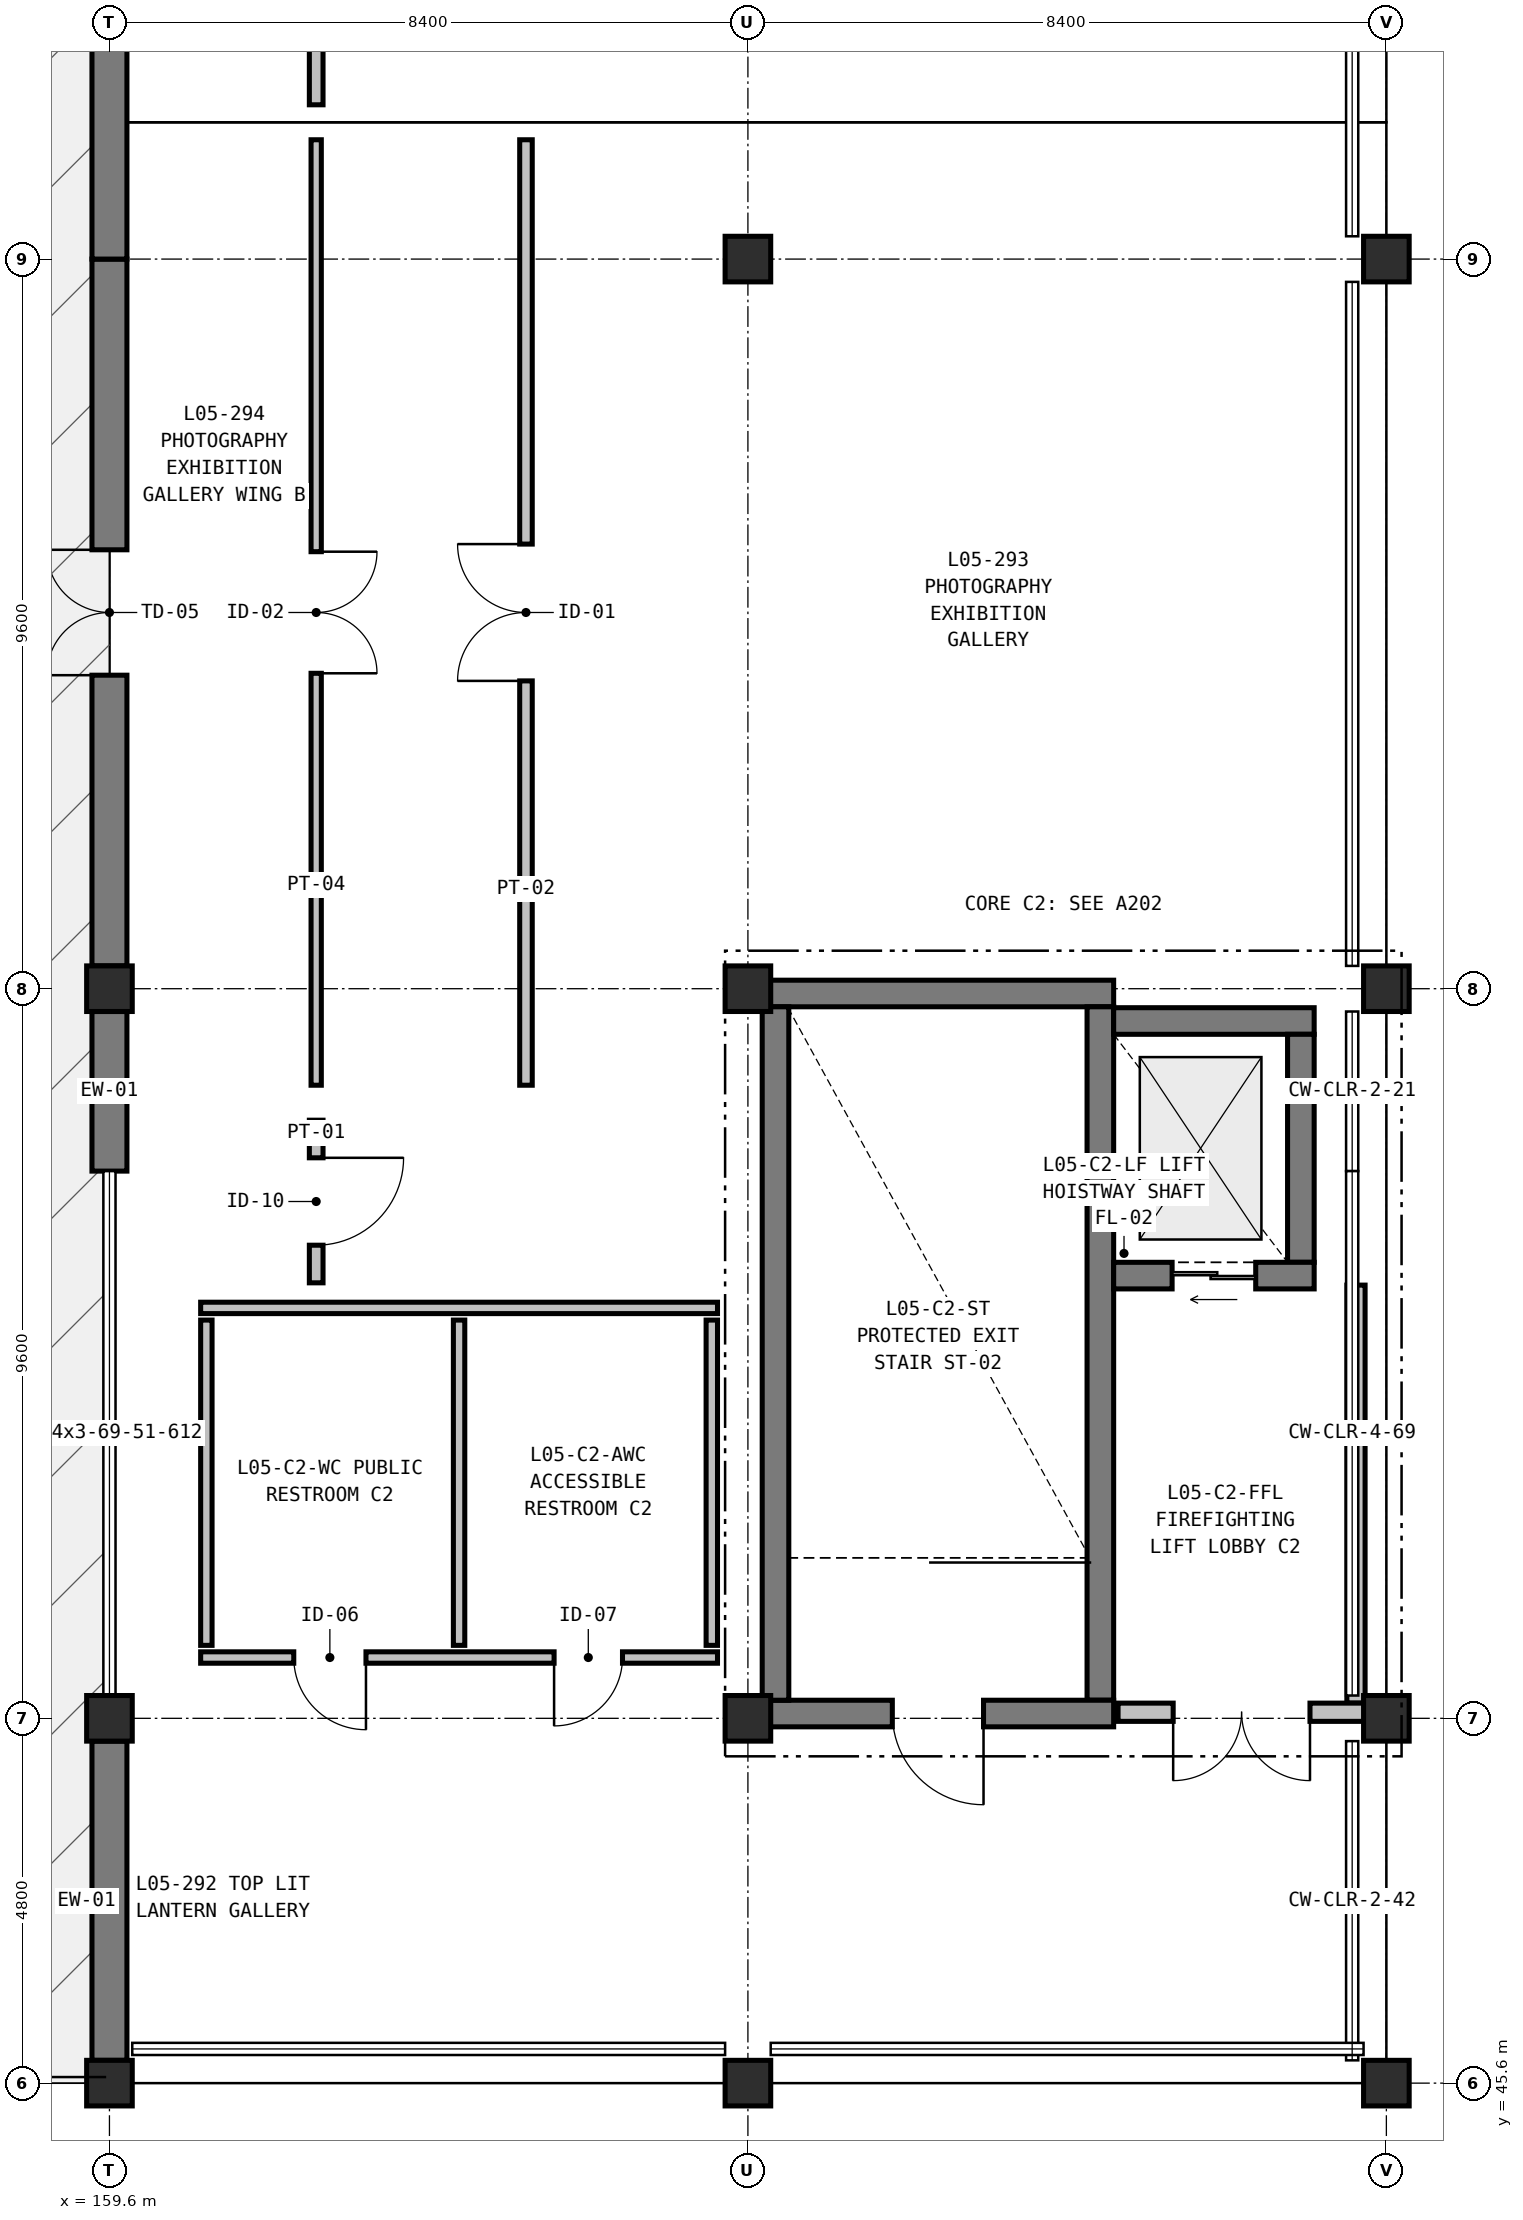
"""IFC4 building model, lengths in metres.
Left out: names, types, materials, properties, quantities, classifications, styles, units other than length and angle.
Written with IfcOpenShell. Run it as: python <this file> out.ifc"""

import sys

from ifc_helpers import new_model, si_unit, direction, frame, frame_2d, origin, origin_2d, place, context, subcontext, project, spatial, rectangle, extrude, element, fill, save


model = new_model("IFC4")
c1 = context("Model", 3, precision=1e-05, world=origin(), true_north=direction((0.0, 1.0)))
c2 = subcontext(c1, "Body", "Model", "MODEL_VIEW")
j1 = project(units=[si_unit("LENGTHUNIT", "METRE"), si_unit("PLANEANGLEUNIT", "RADIAN")], contexts=[c1])
p1 = place(None, origin())
s1 = spatial("IfcSite", under=j1, at=p1, CompositionType="ELEMENT")
p2 = place(p1, origin())
s2 = spatial("IfcBuilding", under=s1, at=p2, CompositionType="ELEMENT")
p3 = place(p2, frame((0.0, 0.0, 27.0)))
s3 = spatial("IfcBuildingStorey", under=s2, at=p3, CompositionType="ELEMENT", Elevation=27.0)
for number, where, z_axis, x_axis in (
    (1, (159.6, 45.6, 0.0), (0.0, 0.0, 1.0), (1.0, 0.0, 0.0)),
    (2, (159.6, 50.4, 0.0), (0.0, 0.0, 1.0), (1.0, 0.0, 0.0)),
    (3, (159.6, 60.0, 0.0), (0.0, 0.0, 1.0), (1.0, 0.0, 0.0)),
    (4, (168.0, 45.6, 0.0), (0.0, 0.0, 1.0), (1.0, 0.0, 0.0)),
    (5, (168.0, 50.4, 0.0), (0.0, 0.0, 1.0), (1.0, 0.0, 0.0)),
    (6, (168.0, 60.0, 0.0), (0.0, 0.0, 1.0), (1.0, 0.0, 0.0)),
    (7, (168.0, 69.6, 0.0), (0.0, 0.0, 1.0), (1.0, 0.0, 0.0)),
    (8, (176.4, 45.6, 0.0), (0.0, 0.0, 1.0), (1.0, 0.0, 0.0)),
    (9, (176.4, 50.4, 0.0), (0.0, 0.0, 1.0), (1.0, 0.0, 0.0)),
    (10, (176.4, 60.0, 0.0), (0.0, 0.0, 1.0), (1.0, 0.0, 0.0)),
    (11, (176.4, 69.6, 0.0), (0.0, 0.0, 1.0), (1.0, 0.0, 0.0)),
):
    element("IfcColumn", number, at=place(p3, frame(where, z_axis=z_axis, x_axis=x_axis)), inside=s3, PredefinedType="COLUMN", context=c2, shape_type="SweptSolid", body=[
        extrude(rectangle(XDim=0.6, YDim=0.6, at=origin_2d()), origin(), (0.0, 0.0, 1.0), 5.4),
    ])
p4 = place(p3, frame((159.6, 45.9, 0.0), z_axis=(0.0, 0.0, 1.0), x_axis=(0.0, 1.0, 0.0)))
e12 = element("IfcWall", 12, at=p4, inside=s3, PredefinedType="SOLIDWALL", context=c2, shape_type="SweptSolid", body=[
    extrude(rectangle(XDim=4.2, YDim=0.46, at=frame_2d((2.1, 0.0))), origin(), (0.0, 0.0, 1.0), 5.14),
])
p5 = place(p3, frame((159.6, 57.6, 0.0), z_axis=(0.0, 0.0, 1.0), x_axis=(0.0, 1.0, 0.0)))
e13 = element("IfcWall", 13, at=p5, inside=s3, PredefinedType="SOLIDWALL", context=c2, shape_type="SweptSolid", body=[
    extrude(rectangle(XDim=2.1, YDim=0.46, at=frame_2d((1.05, 0.0))), origin(), (0.0, 0.0, 1.0), 5.14),
])
p6 = place(p3, frame((159.6, 60.3, 0.0), z_axis=(0.0, 0.0, 1.0), x_axis=(0.0, 1.0, 0.0)))
e14 = element("IfcWall", 14, at=p6, inside=s3, PredefinedType="SOLIDWALL", context=c2, shape_type="SweptSolid", body=[
    extrude(rectangle(XDim=9.3, YDim=0.46, at=frame_2d((4.65, 0.0))), origin(), (0.0, 0.0, 1.0), 5.14),
])
p7 = place(p6, frame((3.825, 0.0, 0.0)))
e15 = element("IfcOpeningElement", 15, at=p7, cuts=e14, PredefinedType="OPENING", context=c2, shape_type="SweptSolid", body=[
    extrude(rectangle(XDim=1.65, YDim=2.35, at=frame_2d((0.825, 1.175))), frame((0.0, 0.24, 0.0), z_axis=(0.0, -1.0, 0.0), x_axis=(1.0, 0.0, 0.0)), (0.0, 0.0, 1.0), 0.48),
])
p8 = place(p3, frame((159.6, 69.6, 0.0), z_axis=(0.0, 0.0, 1.0), x_axis=(0.0, 1.0, 0.0)))
e16 = element("IfcWall", 16, at=p8, inside=s3, PredefinedType="SOLIDWALL", context=c2, shape_type="SweptSolid", body=[
    extrude(rectangle(XDim=9.3, YDim=0.46, at=frame_2d((4.65, 0.0))), origin(), (0.0, 0.0, 1.0), 5.14),
])
p9 = place(p8, frame((3.975, 0.0, 0.0)))
e17 = element("IfcOpeningElement", 17, at=p9, cuts=e16, PredefinedType="OPENING", context=c2, shape_type="SweptSolid", body=[
    extrude(rectangle(XDim=1.35, YDim=2.2, at=frame_2d((0.675, 1.1))), frame((0.0, 0.24, 0.0), z_axis=(0.0, -1.0, 0.0), x_axis=(1.0, 0.0, 0.0)), (0.0, 0.0, 1.0), 0.48),
])
p10 = place(p3, frame((168.188, 59.937, 0.0), z_axis=(0.0, 0.0, 1.0), x_axis=(1.0, 0.0, 0.0)))
e18 = element("IfcWall", 18, at=p10, inside=s3, PredefinedType="SHEAR", context=c2, shape_type="SweptSolid", body=[
    extrude(rectangle(XDim=4.624, YDim=0.35, at=frame_2d((2.312, 0.0))), origin(), (0.0, 0.0, 1.0), 5.1),
])
p11 = place(p3, frame((172.637, 59.762, 0.0), z_axis=(0.0, 0.0, 1.0), x_axis=(0.0, -1.0, 0.0)))
e19 = element("IfcWall", 19, at=p11, inside=s3, PredefinedType="SHEAR", context=c2, shape_type="SweptSolid", body=[
    extrude(rectangle(XDim=9.124, YDim=0.35, at=frame_2d((4.562, 0.0))), origin(), (0.0, 0.0, 1.0), 5.1),
])
p12 = place(p3, frame((172.812, 50.463, 0.0), z_axis=(0.0, 0.0, 1.0), x_axis=(-1.0, 0.0, 0.0)))
e20 = element("IfcWall", 20, at=p12, inside=s3, PredefinedType="SHEAR", context=c2, shape_type="SweptSolid", body=[
    extrude(rectangle(XDim=4.624, YDim=0.35, at=frame_2d((2.312, 0.0))), origin(), (0.0, 0.0, 1.0), 5.1),
])
p13 = place(p12, frame((1.712, 0.0, 0.0)))
e21 = element("IfcOpeningElement", 21, at=p13, cuts=e20, PredefinedType="OPENING", context=c2, shape_type="SweptSolid", body=[
    extrude(rectangle(XDim=1.2, YDim=2.2, at=frame_2d((0.6, 1.1))), frame((0.0, 0.185, 0.0), z_axis=(0.0, -1.0, 0.0), x_axis=(1.0, 0.0, 0.0)), (0.0, 0.0, 1.0), 0.37),
])
p14 = place(p3, frame((168.363, 50.638, 0.0), z_axis=(0.0, 0.0, 1.0), x_axis=(0.0, 1.0, 0.0)))
e22 = element("IfcWall", 22, at=p14, inside=s3, PredefinedType="SHEAR", context=c2, shape_type="SweptSolid", body=[
    extrude(rectangle(XDim=9.124, YDim=0.35, at=frame_2d((4.562, 0.0))), origin(), (0.0, 0.0, 1.0), 5.1),
])
p15 = place(p3, frame((172.812, 59.575, 0.0), z_axis=(0.0, 0.0, 1.0), x_axis=(1.0, 0.0, 0.0)))
e23 = element("IfcWall", 23, at=p15, inside=s3, PredefinedType="SHEAR", context=c2, shape_type="SweptSolid", body=[
    extrude(rectangle(XDim=2.638, YDim=0.35, at=frame_2d((1.319, 0.0))), origin(), (0.0, 0.0, 1.0), 5.1),
])
p16 = place(p3, frame((175.275, 59.4, 0.0), z_axis=(0.0, 0.0, 1.0), x_axis=(0.0, -1.0, 0.0)))
e24 = element("IfcWall", 24, at=p16, inside=s3, PredefinedType="SHEAR", context=c2, shape_type="SweptSolid", body=[
    extrude(rectangle(XDim=3.0, YDim=0.35, at=frame_2d((1.5, 0.0))), origin(), (0.0, 0.0, 1.0), 5.1),
])
p17 = place(p3, frame((175.45, 56.225, 0.0), z_axis=(0.0, 0.0, 1.0), x_axis=(-1.0, 0.0, 0.0)))
e25 = element("IfcWall", 25, at=p17, inside=s3, PredefinedType="SHEAR", context=c2, shape_type="SweptSolid", body=[
    extrude(rectangle(XDim=2.638, YDim=0.35, at=frame_2d((1.319, 0.0))), origin(), (0.0, 0.0, 1.0), 5.1),
])
p18 = place(p17, frame((0.769, 0.0, 0.0)))
e26 = element("IfcOpeningElement", 26, at=p18, cuts=e25, PredefinedType="OPENING", context=c2, shape_type="SweptSolid", body=[
    extrude(rectangle(XDim=1.1, YDim=2.2, at=frame_2d((0.55, 1.1))), frame((0.0, 0.185, 0.0), z_axis=(0.0, -1.0, 0.0), x_axis=(1.0, 0.0, 0.0)), (0.0, 0.0, 1.0), 0.37),
])
p19 = place(p3, frame((176.0, 56.1, 0.0), z_axis=(0.0, 0.0, 1.0), x_axis=(0.0, -1.0, 0.0)))
e27 = element("IfcWall", 27, at=p19, inside=s3, PredefinedType="PARTITIONING", context=c2, shape_type="SweptSolid", body=[
    extrude(rectangle(XDim=5.5, YDim=0.24, at=frame_2d((2.75, 0.0))), origin(), (0.0, 0.0, 1.0), 4.465),
])
p20 = place(p3, frame((176.12, 50.48, 0.0), z_axis=(0.0, 0.0, 1.0), x_axis=(-1.0, 0.0, 0.0)))
e28 = element("IfcWall", 28, at=p20, inside=s3, PredefinedType="PARTITIONING", context=c2, shape_type="SweptSolid", body=[
    extrude(rectangle(XDim=3.25, YDim=0.24, at=frame_2d((1.625, 0.0))), origin(), (0.0, 0.0, 1.0), 4.465),
])
p21 = place(p20, frame((0.725, 0.0, 0.0)))
e29 = element("IfcOpeningElement", 29, at=p21, cuts=e28, PredefinedType="OPENING", context=c2, shape_type="SweptSolid", body=[
    extrude(rectangle(XDim=1.8, YDim=2.25, at=frame_2d((0.9, 1.125))), frame((0.0, 0.13, 0.0), z_axis=(0.0, -1.0, 0.0), x_axis=(1.0, 0.0, 0.0)), (0.0, 0.0, 1.0), 0.26),
])
p22 = place(p3, frame((167.6, 51.2, 0.0), z_axis=(0.0, 0.0, 1.0), x_axis=(-1.0, 0.0, 0.0)))
e30 = element("IfcWall", 30, at=p22, inside=s3, PredefinedType="PARTITIONING", context=c2, shape_type="SweptSolid", body=[
    extrude(rectangle(XDim=6.8, YDim=0.15, at=frame_2d((3.4, 0.0))), origin(), (0.0, 0.0, 1.0), 5.1),
])
p23 = place(p22, frame((1.25, 0.0, 0.0)))
e31 = element("IfcOpeningElement", 31, at=p23, cuts=e30, PredefinedType="OPENING", context=c2, shape_type="SweptSolid", body=[
    extrude(rectangle(XDim=0.9, YDim=2.1, at=frame_2d((0.45, 1.05))), frame((0.0, 0.085, 0.0), z_axis=(0.0, -1.0, 0.0), x_axis=(1.0, 0.0, 0.0)), (0.0, 0.0, 1.0), 0.17),
])
p24 = place(p22, frame((4.625, 0.0, 0.0)))
e32 = element("IfcOpeningElement", 32, at=p24, cuts=e30, PredefinedType="OPENING", context=c2, shape_type="SweptSolid", body=[
    extrude(rectangle(XDim=0.95, YDim=2.15, at=frame_2d((0.475, 1.075))), frame((0.0, 0.085, 0.0), z_axis=(0.0, -1.0, 0.0), x_axis=(1.0, 0.0, 0.0)), (0.0, 0.0, 1.0), 0.17),
])
p25 = place(p3, frame((160.8, 55.8, 0.0), z_axis=(0.0, 0.0, 1.0), x_axis=(1.0, 0.0, 0.0)))
e33 = element("IfcWall", 33, at=p25, inside=s3, PredefinedType="PARTITIONING", context=c2, shape_type="SweptSolid", body=[
    extrude(rectangle(XDim=6.8, YDim=0.15, at=frame_2d((3.4, 0.0))), origin(), (0.0, 0.0, 1.0), 5.1),
])
for number, where, z_axis, x_axis in (
    (34, (160.875, 51.36, 0.0), (0.0, 0.0, 1.0), (0.0, 1.0, 0.0)),
    (35, (164.2, 51.36, 0.0), (0.0, 0.0, 1.0), (0.0, 1.0, 0.0)),
    (36, (167.525, 51.36, 0.0), (0.0, 0.0, 1.0), (0.0, 1.0, 0.0)),
):
    element("IfcWall", number, at=place(p3, frame(where, z_axis=z_axis, x_axis=x_axis)), inside=s3, PredefinedType="PARTITIONING", context=c2, shape_type="SweptSolid", body=[
        extrude(rectangle(XDim=4.28, YDim=0.15, at=frame_2d((2.14, 0.0))), origin(), (0.0, 0.0, 1.0), 5.1),
    ])
p26 = place(p3, frame((162.32, 58.27, 0.0), z_axis=(0.0, 0.0, 1.0), x_axis=(0.0, -1.0, 0.0)))
e37 = element("IfcWall", 37, at=p26, inside=s3, PredefinedType="PARTITIONING", context=c2, shape_type="SweptSolid", body=[
    extrude(rectangle(XDim=2.14, YDim=0.18, at=frame_2d((1.07, 0.0))), origin(), (0.0, 0.0, 1.0), 5.14),
])
p27 = place(p26, frame((0.495, 0.0, 0.0)))
e38 = element("IfcOpeningElement", 38, at=p27, cuts=e37, PredefinedType="OPENING", context=c2, shape_type="SweptSolid", body=[
    extrude(rectangle(XDim=1.15, YDim=2.2, at=frame_2d((0.575, 1.1))), frame((0.0, 0.1, 0.0), z_axis=(0.0, -1.0, 0.0), x_axis=(1.0, 0.0, 0.0)), (0.0, 0.0, 1.0), 0.2),
])
p28 = place(p3, frame((165.08, 58.73, 0.0), z_axis=(0.0, 0.0, 1.0), x_axis=(0.0, 1.0, 0.0)))
e39 = element("IfcWall", 39, at=p28, inside=s3, PredefinedType="PARTITIONING", context=c2, shape_type="SweptSolid", body=[
    extrude(rectangle(XDim=12.44, YDim=0.165, at=frame_2d((6.22, 0.0))), origin(), (0.0, 0.0, 1.0), 4.465),
])
p29 = place(p28, frame((5.32, 0.0, 0.0)))
e40 = element("IfcOpeningElement", 40, at=p29, cuts=e39, PredefinedType="OPENING", context=c2, shape_type="SweptSolid", body=[
    extrude(rectangle(XDim=1.8, YDim=2.4, at=frame_2d((0.9, 1.2))), frame((0.0, 0.093, 0.0), z_axis=(0.0, -1.0, 0.0), x_axis=(1.0, 0.0, 0.0)), (0.0, 0.0, 1.0), 0.185),
])
p30 = place(p3, frame((162.32, 71.17, 0.0), z_axis=(0.0, 0.0, 1.0), x_axis=(0.0, -1.0, 0.0)))
e41 = element("IfcWall", 41, at=p30, inside=s3, PredefinedType="PARTITIONING", context=c2, shape_type="SweptSolid", body=[
    extrude(rectangle(XDim=12.44, YDim=0.135, at=frame_2d((6.22, 0.0))), origin(), (0.0, 0.0, 1.0), 4.465),
])
p31 = place(p30, frame((5.42, 0.0, 0.0)))
e42 = element("IfcOpeningElement", 42, at=p31, cuts=e41, PredefinedType="OPENING", context=c2, shape_type="SweptSolid", body=[
    extrude(rectangle(XDim=1.6, YDim=2.35, at=frame_2d((0.8, 1.175))), frame((0.0, 0.077, 0.0), z_axis=(0.0, -1.0, 0.0), x_axis=(1.0, 0.0, 0.0)), (0.0, 0.0, 1.0), 0.155),
])
p32 = place(p3, frame((162.32, 82.47, 0.0), z_axis=(0.0, 0.0, 1.0), x_axis=(0.0, -1.0, 0.0)))
e43 = element("IfcWall", 43, at=p32, inside=s3, PredefinedType="PARTITIONING", context=c2, shape_type="SweptSolid", body=[
    extrude(rectangle(XDim=10.84, YDim=0.18, at=frame_2d((5.42, 0.0))), origin(), (0.0, 0.0, 1.0), 4.465),
])
p33 = place(p32, frame((4.895, 0.0, 0.0)))
e44 = element("IfcOpeningElement", 44, at=p33, cuts=e43, PredefinedType="OPENING", context=c2, shape_type="SweptSolid", body=[
    extrude(rectangle(XDim=1.05, YDim=2.2, at=frame_2d((0.525, 1.1))), frame((0.0, 0.1, 0.0), z_axis=(0.0, -1.0, 0.0), x_axis=(1.0, 0.0, 0.0)), (0.0, 0.0, 1.0), 0.2),
])
p34 = place(p7, origin())
e45 = element("IfcDoor", 45, at=p34, inside=s3, OperationType="DOUBLE_DOOR_SINGLE_SWING", PredefinedType="DOOR", context=c2, shape_type="SweptSolid", body=[
    extrude(rectangle(XDim=1.65, YDim=2.35, at=frame_2d((0.825, 1.175))), frame((0.0, 0.025, 0.0), z_axis=(0.0, -1.0, 0.0), x_axis=(1.0, 0.0, 0.0)), (0.0, 0.0, 1.0), 0.05),
])
fill(e15, e45)
p35 = place(p13, origin())
e46 = element("IfcDoor", 46, at=p35, inside=s3, OperationType="SINGLE_SWING_LEFT", PredefinedType="DOOR", context=c2, shape_type="SweptSolid", body=[
    extrude(rectangle(XDim=1.2, YDim=2.2, at=frame_2d((0.6, 1.1))), frame((0.0, 0.025, 0.0), z_axis=(0.0, -1.0, 0.0), x_axis=(1.0, 0.0, 0.0)), (0.0, 0.0, 1.0), 0.05),
])
fill(e21, e46)
p36 = place(p18, origin())
e47 = element("IfcDoor", 47, at=p36, inside=s3, OperationType="DOUBLE_DOOR_SLIDING", PredefinedType="DOOR", context=c2, shape_type="SweptSolid", body=[
    extrude(rectangle(XDim=1.1, YDim=2.2, at=frame_2d((0.55, 1.1))), frame((0.0, 0.025, 0.0), z_axis=(0.0, -1.0, 0.0), x_axis=(1.0, 0.0, 0.0)), (0.0, 0.0, 1.0), 0.05),
])
fill(e26, e47)
p37 = place(p21, origin())
e48 = element("IfcDoor", 48, at=p37, inside=s3, OperationType="DOUBLE_DOOR_SINGLE_SWING", PredefinedType="DOOR", context=c2, shape_type="SweptSolid", body=[
    extrude(rectangle(XDim=1.8, YDim=2.25, at=frame_2d((0.9, 1.125))), frame((0.0, 0.025, 0.0), z_axis=(0.0, -1.0, 0.0), x_axis=(1.0, 0.0, 0.0)), (0.0, 0.0, 1.0), 0.05),
])
fill(e29, e48)
p38 = place(p23, origin())
e49 = element("IfcDoor", 49, at=p38, inside=s3, OperationType="SINGLE_SWING_RIGHT", PredefinedType="DOOR", context=c2, shape_type="SweptSolid", body=[
    extrude(rectangle(XDim=0.9, YDim=2.1, at=frame_2d((0.45, 1.05))), frame((0.0, 0.025, 0.0), z_axis=(0.0, -1.0, 0.0), x_axis=(1.0, 0.0, 0.0)), (0.0, 0.0, 1.0), 0.05),
])
fill(e31, e49)
p39 = place(p24, origin())
e50 = element("IfcDoor", 50, at=p39, inside=s3, OperationType="SINGLE_SWING_LEFT", PredefinedType="DOOR", context=c2, shape_type="SweptSolid", body=[
    extrude(rectangle(XDim=0.95, YDim=2.15, at=frame_2d((0.475, 1.075))), frame((0.0, 0.025, 0.0), z_axis=(0.0, -1.0, 0.0), x_axis=(1.0, 0.0, 0.0)), (0.0, 0.0, 1.0), 0.05),
])
fill(e32, e50)
p40 = place(p27, origin())
e51 = element("IfcDoor", 51, at=p40, inside=s3, OperationType="SINGLE_SWING_LEFT", PredefinedType="DOOR", context=c2, shape_type="SweptSolid", body=[
    extrude(rectangle(XDim=1.15, YDim=2.2, at=frame_2d((0.575, 1.1))), frame((0.0, 0.025, 0.0), z_axis=(0.0, -1.0, 0.0), x_axis=(1.0, 0.0, 0.0)), (0.0, 0.0, 1.0), 0.05),
])
fill(e38, e51)
p41 = place(p29, origin())
e52 = element("IfcDoor", 52, at=p41, inside=s3, OperationType="DOUBLE_DOOR_SINGLE_SWING", PredefinedType="DOOR", context=c2, shape_type="SweptSolid", body=[
    extrude(rectangle(XDim=1.8, YDim=2.4, at=frame_2d((0.9, 1.2))), frame((0.0, 0.025, 0.0), z_axis=(0.0, -1.0, 0.0), x_axis=(1.0, 0.0, 0.0)), (0.0, 0.0, 1.0), 0.05),
])
fill(e40, e52)
p42 = place(p31, origin())
e53 = element("IfcDoor", 53, at=p42, inside=s3, OperationType="DOUBLE_DOOR_SINGLE_SWING", PredefinedType="DOOR", context=c2, shape_type="SweptSolid", body=[
    extrude(rectangle(XDim=1.6, YDim=2.35, at=frame_2d((0.8, 1.175))), frame((0.0, 0.025, 0.0), z_axis=(0.0, -1.0, 0.0), x_axis=(1.0, 0.0, 0.0)), (0.0, 0.0, 1.0), 0.05),
])
fill(e42, e53)
save(model, sys.argv[1])
